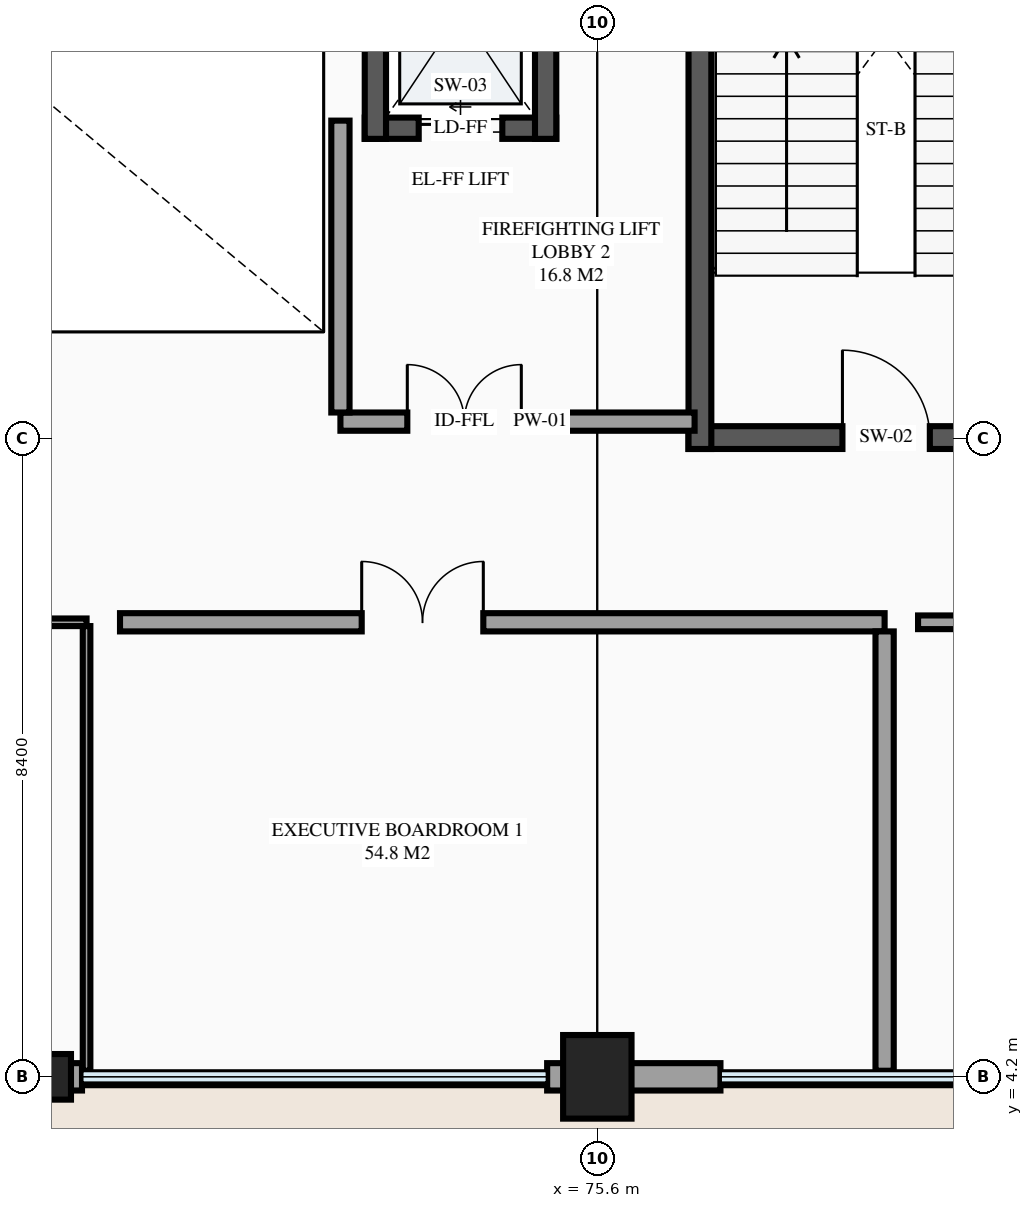
"""IFC4 building model, lengths in metres.
Left out: names, types, materials, properties, quantities, classifications, styles, units other than length and angle.
Written with IfcOpenShell. Run it as: python <this file> out.ifc"""

import sys

from ifc_helpers import new_model, si_unit, direction, frame, frame_2d, origin, origin_2d, place, context, subcontext, project, spatial, rectangle, extrude, element, fill, save


model = new_model("IFC4")
c1 = context("Model", 3, precision=1e-05, world=origin(), true_north=direction((0.0, 1.0)))
c2 = subcontext(c1, "Body", "Model", "MODEL_VIEW")
j1 = project(units=[si_unit("LENGTHUNIT", "METRE"), si_unit("PLANEANGLEUNIT", "RADIAN")], contexts=[c1])
p1 = place(None, origin())
s1 = spatial("IfcSite", under=j1, at=p1, CompositionType="ELEMENT")
p2 = place(p1, origin())
s2 = spatial("IfcBuilding", under=s1, at=p2, CompositionType="ELEMENT")
p3 = place(p2, frame((0.0, 0.0, 9.9)))
s3 = spatial("IfcBuildingStorey", under=s2, at=p3, CompositionType="ELEMENT", Elevation=9.9)
p4 = place(p3, frame((75.6, 4.2, 0.0), z_axis=(0.0, 0.0, 1.0), x_axis=(1.0, 0.0, 0.0)))
e1 = element("IfcColumn", 1, at=p4, inside=s3, PredefinedType="COLUMN", context=c2, shape_type="SweptSolid", body=[
    extrude(rectangle(XDim=0.9, YDim=1.1, at=origin_2d()), origin(), (0.0, 0.0, 1.0), 4.2),
])
p5 = place(p3, frame((68.5, 4.2, 0.0), z_axis=(0.0, 0.0, 1.0), x_axis=(1.0, 0.0, 0.0)))
e2 = element("IfcColumn", 2, at=p5, inside=s3, PredefinedType="PILASTER", context=c2, shape_type="SweptSolid", body=[
    extrude(rectangle(XDim=0.35, YDim=0.6, at=origin_2d()), origin(), (0.0, 0.0, 1.0), 4.2),
])
p6 = place(p3, frame((67.2, 4.2, 0.0), z_axis=(0.0, 0.0, 1.0), x_axis=(1.0, 0.0, 0.0)))
e3 = element("IfcWall", 3, at=p6, inside=s3, PredefinedType="STANDARD", context=c2, shape_type="SweptSolid", body=[
    extrude(rectangle(XDim=1.62, YDim=0.36, at=frame_2d((0.81, 0.0))), origin(), (0.0, 0.0, 1.0), 3.655),
])
p7 = place(p3, frame((74.94, 4.2, 0.0), z_axis=(0.0, 0.0, 1.0), x_axis=(1.0, 0.0, 0.0)))
e4 = element("IfcWall", 4, at=p7, inside=s3, PredefinedType="STANDARD", context=c2, shape_type="SweptSolid", body=[
    extrude(rectangle(XDim=0.66, YDim=0.36, at=frame_2d((0.33, 0.0))), origin(), (0.0, 0.0, 1.0), 4.2),
])
p8 = place(p3, frame((75.6, 4.2, 0.0), z_axis=(0.0, 0.0, 1.0), x_axis=(1.0, 0.0, 0.0)))
e5 = element("IfcWall", 5, at=p8, inside=s3, PredefinedType="STANDARD", context=c2, shape_type="SweptSolid", body=[
    extrude(rectangle(XDim=1.62, YDim=0.36, at=frame_2d((0.81, 0.0))), origin(), (0.0, 0.0, 1.0), 3.357),
])
p9 = place(p3, frame((72.54, 16.68, 0.0), z_axis=(0.0, 0.0, 1.0), x_axis=(1.0, 0.0, 0.0)))
e6 = element("IfcWall", 6, at=p9, inside=s3, PredefinedType="SHEAR", context=c2, shape_type="SweptSolid", body=[
    extrude(rectangle(XDim=2.52, YDim=0.28, at=frame_2d((1.26, 0.0))), origin(), (0.0, 0.0, 1.0), 4.2),
])
p10 = place(p9, frame((0.71, 0.0, 0.0)))
e7 = element("IfcOpeningElement", 7, at=p10, cuts=e6, PredefinedType="OPENING", context=c2, shape_type="SweptSolid", body=[
    extrude(rectangle(XDim=1.1, YDim=2.2, at=frame_2d((0.55, 1.1))), frame((0.0, 0.15, 0.0), z_axis=(0.0, -1.0, 0.0), x_axis=(1.0, 0.0, 0.0)), (0.0, 0.0, 1.0), 0.3),
])
for number, where, z_axis, x_axis in (
    (8, (74.92, 16.54, 0.0), (0.0, 0.0, 1.0), (0.0, 1.0, 0.0)),
    (9, (72.68, 19.86, 0.0), (0.0, 0.0, 1.0), (0.0, -1.0, 0.0)),
):
    element("IfcWall", number, at=place(p3, frame(where, z_axis=z_axis, x_axis=x_axis)), inside=s3, PredefinedType="SHEAR", context=c2, shape_type="SweptSolid", body=[
        extrude(rectangle(XDim=3.32, YDim=0.28, at=frame_2d((1.66, 0.0))), origin(), (0.0, 0.0, 1.0), 4.2),
    ])
p11 = place(p3, frame((76.8, 12.61, 0.0), z_axis=(0.0, 0.0, 1.0), x_axis=(1.0, 0.0, 0.0)))
e10 = element("IfcWall", 10, at=p11, inside=s3, PredefinedType="SHEAR", context=c2, shape_type="SweptSolid", body=[
    extrude(rectangle(XDim=5.2, YDim=0.3, at=frame_2d((2.6, 0.0))), origin(), (0.0, 0.0, 1.0), 4.2),
])
p12 = place(p11, frame((2.025, 0.0, 0.0)))
e11 = element("IfcOpeningElement", 11, at=p12, cuts=e10, PredefinedType="OPENING", context=c2, shape_type="SweptSolid", body=[
    extrude(rectangle(XDim=1.15, YDim=2.15, at=frame_2d((0.575, 1.075))), frame((0.0, 0.16, 0.0), z_axis=(0.0, -1.0, 0.0), x_axis=(1.0, 0.0, 0.0)), (0.0, 0.0, 1.0), 0.32),
])
p13 = place(p3, frame((76.95, 21.3, 0.0), z_axis=(0.0, 0.0, 1.0), x_axis=(0.0, -1.0, 0.0)))
e12 = element("IfcWall", 12, at=p13, inside=s3, PredefinedType="SHEAR", context=c2, shape_type="SweptSolid", body=[
    extrude(rectangle(XDim=8.84, YDim=0.3, at=frame_2d((4.42, 0.0))), origin(), (0.0, 0.0, 1.0), 4.2),
])
p14 = place(p3, frame((72.22, 12.82, 0.0), z_axis=(0.0, 0.0, 1.0), x_axis=(1.0, 0.0, 0.0)))
e13 = element("IfcWall", 13, at=p14, inside=s3, PredefinedType="PARTITIONING", context=c2, shape_type="SweptSolid", body=[
    extrude(rectangle(XDim=4.66, YDim=0.24, at=frame_2d((2.33, 0.0))), origin(), (0.0, 0.0, 1.0), 3.955),
])
p15 = place(p14, frame((0.88, 0.0, 0.0)))
e14 = element("IfcOpeningElement", 14, at=p15, cuts=e13, PredefinedType="OPENING", context=c2, shape_type="SweptSolid", body=[
    extrude(rectangle(XDim=1.5, YDim=2.15, at=frame_2d((0.75, 1.075))), frame((0.0, 0.13, 0.0), z_axis=(0.0, -1.0, 0.0), x_axis=(1.0, 0.0, 0.0)), (0.0, 0.0, 1.0), 0.26),
])
p16 = place(p3, frame((72.22, 12.94, 0.0), z_axis=(0.0, 0.0, 1.0), x_axis=(0.0, 1.0, 0.0)))
e15 = element("IfcWall", 15, at=p16, inside=s3, PredefinedType="PARTITIONING", context=c2, shape_type="SweptSolid", body=[
    extrude(rectangle(XDim=3.84, YDim=0.24, at=frame_2d((1.92, 0.0))), origin(), (0.0, 0.0, 1.0), 3.955),
])
p17 = place(p3, frame((58.82, 10.18, 0.0), z_axis=(0.0, 0.0, 1.0), x_axis=(1.0, 0.0, 0.0)))
e16 = element("IfcWall", 16, at=p17, inside=s3, PredefinedType="PARTITIONING", context=c2, shape_type="SweptSolid", body=[
    extrude(rectangle(XDim=10.06, YDim=0.1, at=frame_2d((5.03, 0.0))), origin(), (0.0, 0.0, 1.0), 3.955),
])
p18 = place(p17, frame((4.23, 0.0, 0.0)))
e17 = element("IfcOpeningElement", 17, at=p18, cuts=e16, PredefinedType="OPENING", context=c2, shape_type="SweptSolid", body=[
    extrude(rectangle(XDim=1.6, YDim=2.25, at=frame_2d((0.8, 1.125))), frame((0.0, 0.06, 0.0), z_axis=(0.0, -1.0, 0.0), x_axis=(1.0, 0.0, 0.0)), (0.0, 0.0, 1.0), 0.12),
])
p19 = place(p3, frame((68.88, 4.28, 0.0), z_axis=(0.0, 0.0, 1.0), x_axis=(0.0, 1.0, 0.0)))
e18 = element("IfcWall", 18, at=p19, inside=s3, PredefinedType="PARTITIONING", context=c2, shape_type="SweptSolid", body=[
    extrude(rectangle(XDim=5.85, YDim=0.1, at=frame_2d((2.925, 0.0))), origin(), (0.0, 0.0, 1.0), 3.955),
])
p20 = place(p3, frame((69.32, 10.18, 0.0), z_axis=(0.0, 0.0, 1.0), x_axis=(1.0, 0.0, 0.0)))
e19 = element("IfcWall", 19, at=p20, inside=s3, PredefinedType="PARTITIONING", context=c2, shape_type="SweptSolid", body=[
    extrude(rectangle(XDim=10.06, YDim=0.24, at=frame_2d((5.03, 0.0))), origin(), (0.0, 0.0, 1.0), 3.955),
])
p21 = place(p20, frame((3.18, 0.0, 0.0)))
e20 = element("IfcOpeningElement", 20, at=p21, cuts=e19, PredefinedType="OPENING", context=c2, shape_type="SweptSolid", body=[
    extrude(rectangle(XDim=1.6, YDim=2.25, at=frame_2d((0.8, 1.125))), frame((0.0, 0.13, 0.0), z_axis=(0.0, -1.0, 0.0), x_axis=(1.0, 0.0, 0.0)), (0.0, 0.0, 1.0), 0.26),
])
p22 = place(p3, frame((79.38, 4.28, 0.0), z_axis=(0.0, 0.0, 1.0), x_axis=(0.0, 1.0, 0.0)))
e21 = element("IfcWall", 21, at=p22, inside=s3, PredefinedType="PARTITIONING", context=c2, shape_type="SweptSolid", body=[
    extrude(rectangle(XDim=5.78, YDim=0.24, at=frame_2d((2.89, 0.0))), origin(), (0.0, 0.0, 1.0), 3.955),
])
p23 = place(p3, frame((79.82, 10.18, 0.0), z_axis=(0.0, 0.0, 1.0), x_axis=(1.0, 0.0, 0.0)))
e22 = element("IfcWall", 22, at=p23, inside=s3, PredefinedType="PARTITIONING", context=c2, shape_type="SweptSolid", body=[
    extrude(rectangle(XDim=10.06, YDim=0.18, at=frame_2d((5.03, 0.0))), origin(), (0.0, 0.0, 1.0), 3.955),
])
p24 = place(p23, frame((5.63, 0.0, 0.0)))
e23 = element("IfcOpeningElement", 23, at=p24, cuts=e22, PredefinedType="OPENING", context=c2, shape_type="SweptSolid", body=[
    extrude(rectangle(XDim=1.6, YDim=2.25, at=frame_2d((0.8, 1.125))), frame((0.0, 0.1, 0.0), z_axis=(0.0, -1.0, 0.0), x_axis=(1.0, 0.0, 0.0)), (0.0, 0.0, 1.0), 0.2),
])
p25 = place(p10, origin())
e24 = element("IfcDoor", 24, at=p25, inside=s3, OperationType="SLIDING_TO_LEFT", PredefinedType="DOOR", context=c2, shape_type="SweptSolid", body=[
    extrude(rectangle(XDim=1.1, YDim=2.2, at=frame_2d((0.55, 1.1))), frame((0.0, 0.025, 0.0), z_axis=(0.0, -1.0, 0.0), x_axis=(1.0, 0.0, 0.0)), (0.0, 0.0, 1.0), 0.05),
])
fill(e7, e24)
p26 = place(p12, origin())
e25 = element("IfcDoor", 25, at=p26, inside=s3, OperationType="SINGLE_SWING_LEFT", PredefinedType="DOOR", context=c2, shape_type="SweptSolid", body=[
    extrude(rectangle(XDim=1.15, YDim=2.15, at=frame_2d((0.575, 1.075))), frame((0.0, 0.025, 0.0), z_axis=(0.0, -1.0, 0.0), x_axis=(1.0, 0.0, 0.0)), (0.0, 0.0, 1.0), 0.05),
])
fill(e11, e25)
p27 = place(p15, origin())
e26 = element("IfcDoor", 26, at=p27, inside=s3, OperationType="DOUBLE_DOOR_SINGLE_SWING", PredefinedType="DOOR", context=c2, shape_type="SweptSolid", body=[
    extrude(rectangle(XDim=1.5, YDim=2.15, at=frame_2d((0.75, 1.075))), frame((0.0, 0.025, 0.0), z_axis=(0.0, -1.0, 0.0), x_axis=(1.0, 0.0, 0.0)), (0.0, 0.0, 1.0), 0.05),
])
fill(e14, e26)
p28 = place(p21, origin())
e27 = element("IfcDoor", 27, at=p28, inside=s3, OperationType="DOUBLE_DOOR_SINGLE_SWING", PredefinedType="DOOR", context=c2, shape_type="SweptSolid", body=[
    extrude(rectangle(XDim=1.6, YDim=2.25, at=frame_2d((0.8, 1.125))), frame((0.0, 0.025, 0.0), z_axis=(0.0, -1.0, 0.0), x_axis=(1.0, 0.0, 0.0)), (0.0, 0.0, 1.0), 0.05),
])
fill(e20, e27)
save(model, sys.argv[1])
